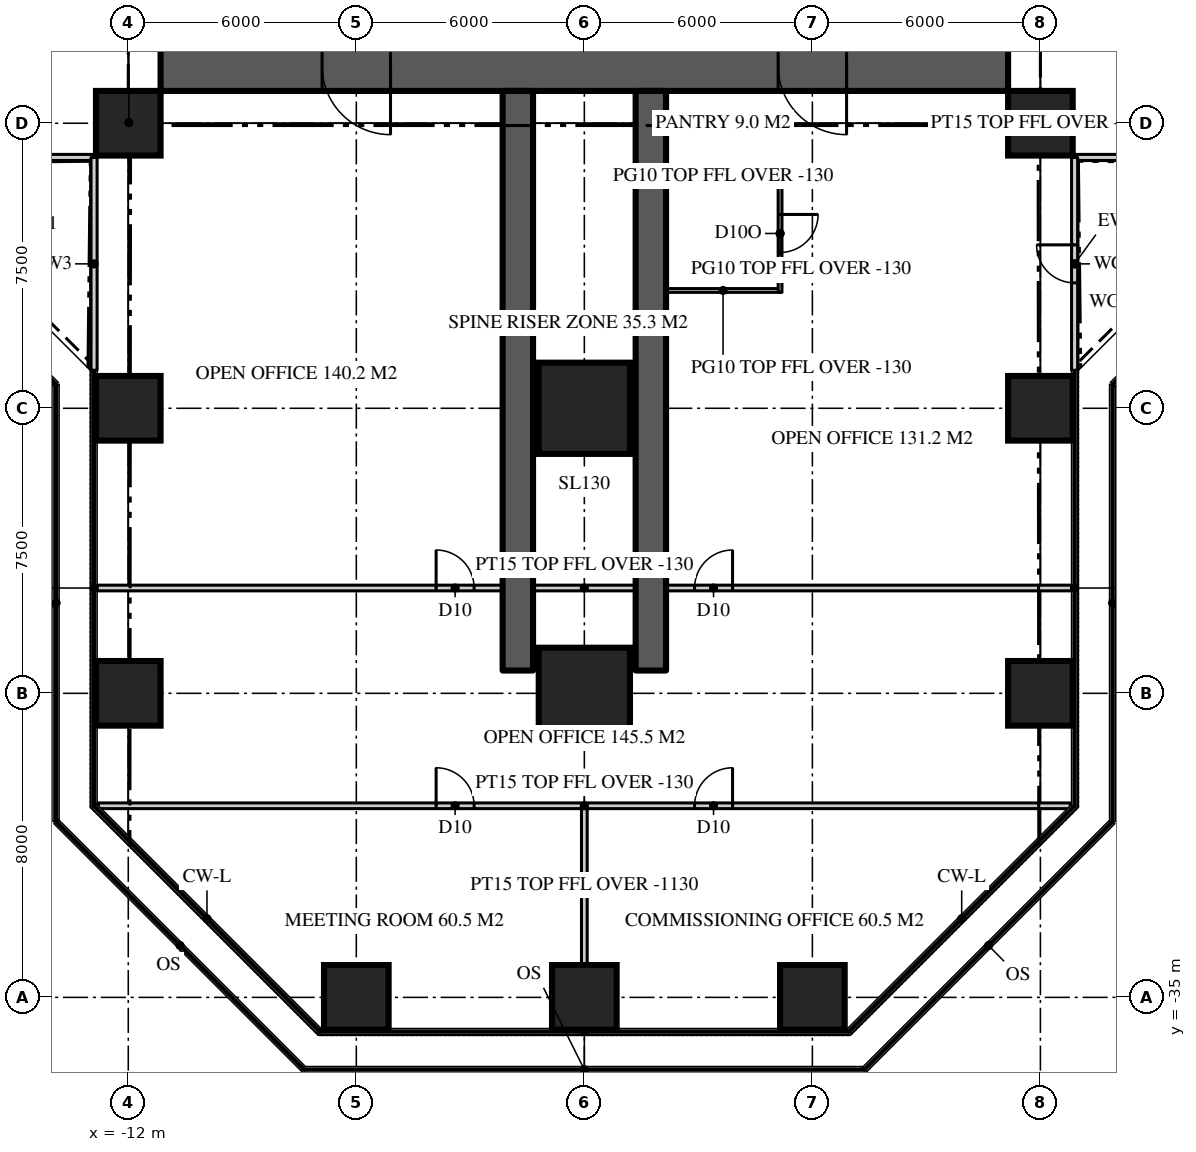
"""IFC4 building model, lengths in metres.
Left out: names, types, materials, properties, quantities, classifications, styles, units other than length and angle.
Written with IfcOpenShell. Run it as: python <this file> out.ifc"""

import sys

from ifc_helpers import new_model, si_unit, direction, frame, frame_2d, origin, origin_2d, place, context, subcontext, project, spatial, rectangle, extrude, element, fill, save


model = new_model("IFC4")
c1 = context("Model", 3, precision=1e-05, world=origin(), true_north=direction((0.0, 1.0)))
c2 = subcontext(c1, "Body", "Model", "MODEL_VIEW")
j1 = project(units=[si_unit("LENGTHUNIT", "METRE"), si_unit("PLANEANGLEUNIT", "RADIAN")], contexts=[c1])
p1 = place(None, origin())
s1 = spatial("IfcSite", under=j1, at=p1, CompositionType="ELEMENT")
p2 = place(p1, origin())
s2 = spatial("IfcBuilding", under=s1, at=p2, CompositionType="ELEMENT")
p3 = place(p2, frame((0.0, 0.0, 78.6)))
s3 = spatial("IfcBuildingStorey", under=s2, at=p3, CompositionType="ELEMENT", Elevation=78.6)
p4 = place(p3, frame((11.15, -10.5, 0.0), z_axis=(0.0, 0.0, 1.0), x_axis=(-1.0, 0.0, 0.0)))
e1 = element("IfcWall", 1, at=p4, inside=s3, PredefinedType="SHEAR", context=c2, shape_type="SweptSolid", body=[
    extrude(rectangle(XDim=22.3, YDim=1.3, at=frame_2d((11.15, 0.0))), origin(), (0.0, 0.0, 1.0), 3.9),
])
p5 = place(p4, frame((16.25, 0.0, 0.0)))
e2 = element("IfcOpeningElement", 2, at=p5, cuts=e1, PredefinedType="OPENING", context=c2, shape_type="SweptSolid", body=[
    extrude(rectangle(XDim=1.8, YDim=2.2, at=frame_2d((0.9, 1.1))), frame((0.0, 0.66, 0.0), z_axis=(0.0, -1.0, 0.0), x_axis=(1.0, 0.0, 0.0)), (0.0, 0.0, 1.0), 1.32),
])
p6 = place(p4, frame((4.25, 0.0, 0.0)))
e3 = element("IfcOpeningElement", 3, at=p6, cuts=e1, PredefinedType="OPENING", context=c2, shape_type="SweptSolid", body=[
    extrude(rectangle(XDim=1.8, YDim=2.2, at=frame_2d((0.9, 1.1))), frame((0.0, 0.66, 0.0), z_axis=(0.0, -1.0, 0.0), x_axis=(1.0, 0.0, 0.0)), (0.0, 0.0, 1.0), 1.32),
])
for number, where, z_axis, x_axis in (
    (4, (-1.75, -11.15, 0.0), (0.0, 0.0, 1.0), (0.0, -1.0, 0.0)),
    (5, (1.75, -11.15, 0.0), (0.0, 0.0, 1.0), (0.0, -1.0, 0.0)),
):
    element("IfcWall", number, at=place(p3, frame(where, z_axis=z_axis, x_axis=x_axis)), inside=s3, PredefinedType="SHEAR", context=c2, shape_type="SweptSolid", body=[
        extrude(rectangle(XDim=15.25, YDim=0.8, at=frame_2d((7.625, 0.0))), origin(), (0.0, 0.0, 1.0), 3.9),
    ])
for number, where, z_axis, x_axis in (
    (6, (-6.0, -35.0, 0.0), (0.0, 0.0, 1.0), (1.0, 0.0, 0.0)),
    (7, (0.0, -35.0, 0.0), (0.0, 0.0, 1.0), (1.0, 0.0, 0.0)),
    (8, (6.0, -35.0, 0.0), (0.0, 0.0, 1.0), (1.0, 0.0, 0.0)),
    (9, (-12.0, -27.0, 0.0), (0.0, 0.0, 1.0), (1.0, 0.0, 0.0)),
):
    element("IfcColumn", number, at=place(p3, frame(where, z_axis=z_axis, x_axis=x_axis)), inside=s3, PredefinedType="COLUMN", context=c2, shape_type="SweptSolid", body=[
        extrude(rectangle(XDim=1.7, YDim=1.7, at=origin_2d()), origin(), (0.0, 0.0, 1.0), 3.9),
    ])
p7 = place(p3, frame((0.0, -27.0, 0.0), z_axis=(0.0, 0.0, 1.0), x_axis=(1.0, 0.0, 0.0)))
e10 = element("IfcColumn", 10, at=p7, inside=s3, PredefinedType="COLUMN", context=c2, shape_type="SweptSolid", body=[
    extrude(rectangle(XDim=2.4, YDim=2.4, at=origin_2d()), origin(), (0.0, 0.0, 1.0), 3.9),
])
for number, where, z_axis, x_axis in (
    (11, (12.0, -27.0, 0.0), (0.0, 0.0, 1.0), (1.0, 0.0, 0.0)),
    (12, (-12.0, -19.5, 0.0), (0.0, 0.0, 1.0), (1.0, 0.0, 0.0)),
):
    element("IfcColumn", number, at=place(p3, frame(where, z_axis=z_axis, x_axis=x_axis)), inside=s3, PredefinedType="COLUMN", context=c2, shape_type="SweptSolid", body=[
        extrude(rectangle(XDim=1.7, YDim=1.7, at=origin_2d()), origin(), (0.0, 0.0, 1.0), 3.9),
    ])
p8 = place(p3, frame((0.0, -19.5, 0.0), z_axis=(0.0, 0.0, 1.0), x_axis=(1.0, 0.0, 0.0)))
e13 = element("IfcColumn", 13, at=p8, inside=s3, PredefinedType="COLUMN", context=c2, shape_type="SweptSolid", body=[
    extrude(rectangle(XDim=2.4, YDim=2.4, at=origin_2d()), origin(), (0.0, 0.0, 1.0), 3.9),
])
for number, where, z_axis, x_axis in (
    (14, (12.0, -19.5, 0.0), (0.0, 0.0, 1.0), (1.0, 0.0, 0.0)),
    (15, (-12.0, -12.0, 0.0), (0.0, 0.0, 1.0), (1.0, 0.0, 0.0)),
    (16, (12.0, -12.0, 0.0), (0.0, 0.0, 1.0), (1.0, 0.0, 0.0)),
):
    element("IfcColumn", number, at=place(p3, frame(where, z_axis=z_axis, x_axis=x_axis)), inside=s3, PredefinedType="COLUMN", context=c2, shape_type="SweptSolid", body=[
        extrude(rectangle(XDim=1.7, YDim=1.7, at=origin_2d()), origin(), (0.0, 0.0, 1.0), 3.9),
    ])
p9 = place(p3, frame((12.9, -12.9, 0.0), z_axis=(0.0, 0.0, 1.0), x_axis=(1.0, 0.0, 0.0)))
e17 = element("IfcWall", 17, at=p9, inside=s3, PredefinedType="SOLIDWALL", context=c2, shape_type="SweptSolid", body=[
    extrude(rectangle(XDim=5.6, YDim=0.16, at=frame_2d((2.8, 0.0))), origin(), (0.0, 0.0, 1.0), 3.77),
])
p10 = place(p3, frame((-18.5, -12.9, 0.0), z_axis=(0.0, 0.0, 1.0), x_axis=(1.0, 0.0, 0.0)))
e18 = element("IfcWall", 18, at=p10, inside=s3, PredefinedType="SOLIDWALL", context=c2, shape_type="SweptSolid", body=[
    extrude(rectangle(XDim=5.6, YDim=0.16, at=frame_2d((2.8, 0.0))), origin(), (0.0, 0.0, 1.0), 3.77),
])
p11 = place(p10, frame((2.3, 0.0, 0.0)))
e19 = element("IfcOpeningElement", 19, at=p11, cuts=e18, PredefinedType="OPENING", context=c2, shape_type="SweptSolid", body=[
    extrude(rectangle(XDim=1.0, YDim=2.2, at=frame_2d((0.5, 1.1))), frame((0.0, 0.09, 0.0), z_axis=(0.0, -1.0, 0.0), x_axis=(1.0, 0.0, 0.0)), (0.0, 0.0, 1.0), 0.18),
])
p12 = place(p3, frame((-12.9, -12.9, 0.0), z_axis=(0.0, 0.0, 1.0), x_axis=(0.0, -1.0, 0.0)))
e20 = element("IfcWall", 20, at=p12, inside=s3, PredefinedType="SOLIDWALL", context=c2, shape_type="SweptSolid", body=[
    extrude(rectangle(XDim=5.6, YDim=0.16, at=frame_2d((2.8, 0.0))), origin(), (0.0, 0.0, 1.0), 3.77),
])
p13 = place(p3, frame((12.9, -18.5, 0.0), z_axis=(0.0, 0.0, 1.0), x_axis=(0.0, 1.0, 0.0)))
e21 = element("IfcWall", 21, at=p13, inside=s3, PredefinedType="SOLIDWALL", context=c2, shape_type="SweptSolid", body=[
    extrude(rectangle(XDim=5.6, YDim=0.16, at=frame_2d((2.8, 0.0))), origin(), (0.0, 0.0, 1.0), 3.77),
])
p14 = place(p13, frame((2.3, 0.0, 0.0)))
e22 = element("IfcOpeningElement", 22, at=p14, cuts=e21, PredefinedType="OPENING", context=c2, shape_type="SweptSolid", body=[
    extrude(rectangle(XDim=1.0, YDim=2.2, at=frame_2d((0.5, 1.1))), frame((0.0, 0.09, 0.0), z_axis=(0.0, -1.0, 0.0), x_axis=(1.0, 0.0, 0.0)), (0.0, 0.0, 1.0), 0.18),
])
p15 = place(p3, frame((-12.82, -24.229, 0.0), z_axis=(0.0, 0.0, 1.0), x_axis=(1.0, 0.0, 0.0)))
e23 = element("IfcWall", 23, at=p15, inside=s3, PredefinedType="PARTITIONING", context=c2, shape_type="SweptSolid", body=[
    extrude(rectangle(XDim=25.64, YDim=0.15, at=frame_2d((12.82, 0.0))), origin(), (0.0, 0.0, 1.0), 3.77),
])
p16 = place(p15, frame((15.72, 0.0, 0.0)))
e24 = element("IfcOpeningElement", 24, at=p16, cuts=e23, PredefinedType="OPENING", context=c2, shape_type="SweptSolid", body=[
    extrude(rectangle(XDim=1.0, YDim=2.2, at=frame_2d((0.5, 1.1))), frame((0.0, 0.085, 0.0), z_axis=(0.0, -1.0, 0.0), x_axis=(1.0, 0.0, 0.0)), (0.0, 0.0, 1.0), 0.17),
])
p17 = place(p15, frame((8.92, 0.0, 0.0)))
e25 = element("IfcOpeningElement", 25, at=p17, cuts=e23, PredefinedType="OPENING", context=c2, shape_type="SweptSolid", body=[
    extrude(rectangle(XDim=1.0, YDim=2.2, at=frame_2d((0.5, 1.1))), frame((0.0, 0.085, 0.0), z_axis=(0.0, -1.0, 0.0), x_axis=(1.0, 0.0, 0.0)), (0.0, 0.0, 1.0), 0.17),
])
p18 = place(p3, frame((-12.786, -29.959, 0.0), z_axis=(0.0, 0.0, 1.0), x_axis=(1.0, 0.0, 0.0)))
e26 = element("IfcWall", 26, at=p18, inside=s3, PredefinedType="PARTITIONING", context=c2, shape_type="SweptSolid", body=[
    extrude(rectangle(XDim=25.573, YDim=0.15, at=frame_2d((12.786, 0.0))), origin(), (0.0, 0.0, 1.0), 3.77),
])
p19 = place(p18, frame((15.687, 0.0, 0.0)))
e27 = element("IfcOpeningElement", 27, at=p19, cuts=e26, PredefinedType="OPENING", context=c2, shape_type="SweptSolid", body=[
    extrude(rectangle(XDim=1.0, YDim=2.2, at=frame_2d((0.5, 1.1))), frame((0.0, 0.085, 0.0), z_axis=(0.0, -1.0, 0.0), x_axis=(1.0, 0.0, 0.0)), (0.0, 0.0, 1.0), 0.17),
])
p20 = place(p18, frame((8.886, 0.0, 0.0)))
e28 = element("IfcOpeningElement", 28, at=p20, cuts=e26, PredefinedType="OPENING", context=c2, shape_type="SweptSolid", body=[
    extrude(rectangle(XDim=1.0, YDim=2.2, at=frame_2d((0.5, 1.1))), frame((0.0, 0.085, 0.0), z_axis=(0.0, -1.0, 0.0), x_axis=(1.0, 0.0, 0.0)), (0.0, 0.0, 1.0), 0.17),
])
p21 = place(p3, frame((0.0, -29.959, 0.0), z_axis=(0.0, 0.0, 1.0), x_axis=(0.0, -1.0, 0.0)))
e29 = element("IfcWall", 29, at=p21, inside=s3, PredefinedType="PARTITIONING", context=c2, shape_type="SweptSolid", body=[
    extrude(rectangle(XDim=4.191, YDim=0.15, at=frame_2d((2.095, 0.0))), origin(), (0.0, 0.0, 1.0), 2.77),
])
for number, where, z_axis, x_axis in (
    (30, (2.15, -13.4, 0.0), (0.0, 0.0, 1.0), (1.0, 0.0, 0.0)),
    (31, (2.15, -16.4, 0.0), (0.0, 0.0, 1.0), (1.0, 0.0, 0.0)),
):
    element("IfcWall", number, at=place(p3, frame(where, z_axis=z_axis, x_axis=x_axis)), inside=s3, PredefinedType="PARTITIONING", context=c2, shape_type="SweptSolid", body=[
        extrude(rectangle(XDim=3.0, YDim=0.1, at=frame_2d((1.5, 0.0))), origin(), (0.0, 0.0, 1.0), 3.77),
    ])
p22 = place(p3, frame((5.15, -13.35, 0.0), z_axis=(0.0, 0.0, 1.0), x_axis=(0.0, -1.0, 0.0)))
e32 = element("IfcWall", 32, at=p22, inside=s3, PredefinedType="PARTITIONING", context=c2, shape_type="SweptSolid", body=[
    extrude(rectangle(XDim=3.1, YDim=0.1, at=frame_2d((1.55, 0.0))), origin(), (0.0, 0.0, 1.0), 3.77),
])
p23 = place(p22, frame((1.05, 0.0, 0.0)))
e33 = element("IfcOpeningElement", 33, at=p23, cuts=e32, PredefinedType="OPENING", context=c2, shape_type="SweptSolid", body=[
    extrude(rectangle(XDim=1.0, YDim=2.2, at=frame_2d((0.5, 1.1))), frame((0.0, 0.06, 0.0), z_axis=(0.0, -1.0, 0.0), x_axis=(1.0, 0.0, 0.0)), (0.0, 0.0, 1.0), 0.12),
])
for number, where, z_axis, x_axis in (
    (34, (-11.15, -11.15, 0.0), (0.0, 0.0, 1.0), (-0.707, -0.707, 0.0)),
    (35, (11.15, -11.15, 0.0), (0.0, 0.0, 1.0), (0.707, -0.707, 0.0)),
):
    element("IfcWall", number, at=place(p3, frame(where, z_axis=z_axis, x_axis=x_axis)), inside=s3, PredefinedType="PARTITIONING", context=c2, shape_type="SweptSolid", body=[
        extrude(rectangle(XDim=2.362, YDim=0.15, at=frame_2d((1.181, 0.0))), origin(), (0.0, 0.0, 1.0), 3.22),
    ])
p24 = place(p14, origin())
e36 = element("IfcDoor", 36, at=p24, inside=s3, OperationType="SINGLE_SWING_RIGHT", PredefinedType="DOOR", context=c2, shape_type="SweptSolid", body=[
    extrude(rectangle(XDim=1.0, YDim=2.2, at=frame_2d((0.5, 1.1))), frame((0.0, 0.025, 0.0), z_axis=(0.0, -1.0, 0.0), x_axis=(1.0, 0.0, 0.0)), (0.0, 0.0, 1.0), 0.05),
])
fill(e22, e36)
p25 = place(p5, origin())
e37 = element("IfcDoor", 37, at=p25, inside=s3, OperationType="DOUBLE_DOOR_DOUBLE_SWING", PredefinedType="DOOR", context=c2, shape_type="SweptSolid", body=[
    extrude(rectangle(XDim=1.8, YDim=2.2, at=frame_2d((0.9, 1.1))), frame((0.0, 0.025, 0.0), z_axis=(0.0, -1.0, 0.0), x_axis=(1.0, 0.0, 0.0)), (0.0, 0.0, 1.0), 0.05),
])
fill(e2, e37)
p26 = place(p6, origin())
e38 = element("IfcDoor", 38, at=p26, inside=s3, OperationType="DOUBLE_DOOR_DOUBLE_SWING", PredefinedType="DOOR", context=c2, shape_type="SweptSolid", body=[
    extrude(rectangle(XDim=1.8, YDim=2.2, at=frame_2d((0.9, 1.1))), frame((0.0, 0.025, 0.0), z_axis=(0.0, -1.0, 0.0), x_axis=(1.0, 0.0, 0.0)), (0.0, 0.0, 1.0), 0.05),
])
fill(e3, e38)
p27 = place(p16, origin())
e39 = element("IfcDoor", 39, at=p27, inside=s3, OperationType="SINGLE_SWING_RIGHT", PredefinedType="DOOR", context=c2, shape_type="SweptSolid", body=[
    extrude(rectangle(XDim=1.0, YDim=2.2, at=frame_2d((0.5, 1.1))), frame((0.0, 0.025, 0.0), z_axis=(0.0, -1.0, 0.0), x_axis=(1.0, 0.0, 0.0)), (0.0, 0.0, 1.0), 0.05),
])
fill(e24, e39)
p28 = place(p17, origin())
e40 = element("IfcDoor", 40, at=p28, inside=s3, OperationType="SINGLE_SWING_LEFT", PredefinedType="DOOR", context=c2, shape_type="SweptSolid", body=[
    extrude(rectangle(XDim=1.0, YDim=2.2, at=frame_2d((0.5, 1.1))), frame((0.0, 0.025, 0.0), z_axis=(0.0, -1.0, 0.0), x_axis=(1.0, 0.0, 0.0)), (0.0, 0.0, 1.0), 0.05),
])
fill(e25, e40)
p29 = place(p19, origin())
e41 = element("IfcDoor", 41, at=p29, inside=s3, OperationType="SINGLE_SWING_RIGHT", PredefinedType="DOOR", context=c2, shape_type="SweptSolid", body=[
    extrude(rectangle(XDim=1.0, YDim=2.2, at=frame_2d((0.5, 1.1))), frame((0.0, 0.025, 0.0), z_axis=(0.0, -1.0, 0.0), x_axis=(1.0, 0.0, 0.0)), (0.0, 0.0, 1.0), 0.05),
])
fill(e27, e41)
p30 = place(p20, origin())
e42 = element("IfcDoor", 42, at=p30, inside=s3, OperationType="SINGLE_SWING_LEFT", PredefinedType="DOOR", context=c2, shape_type="SweptSolid", body=[
    extrude(rectangle(XDim=1.0, YDim=2.2, at=frame_2d((0.5, 1.1))), frame((0.0, 0.025, 0.0), z_axis=(0.0, -1.0, 0.0), x_axis=(1.0, 0.0, 0.0)), (0.0, 0.0, 1.0), 0.05),
])
fill(e28, e42)
p31 = place(p23, origin())
e43 = element("IfcDoor", 43, at=p31, inside=s3, OperationType="SINGLE_SWING_LEFT", PredefinedType="DOOR", context=c2, shape_type="SweptSolid", body=[
    extrude(rectangle(XDim=1.0, YDim=2.2, at=frame_2d((0.5, 1.1))), frame((0.0, 0.025, 0.0), z_axis=(0.0, -1.0, 0.0), x_axis=(1.0, 0.0, 0.0)), (0.0, 0.0, 1.0), 0.05),
])
fill(e33, e43)
save(model, sys.argv[1])
